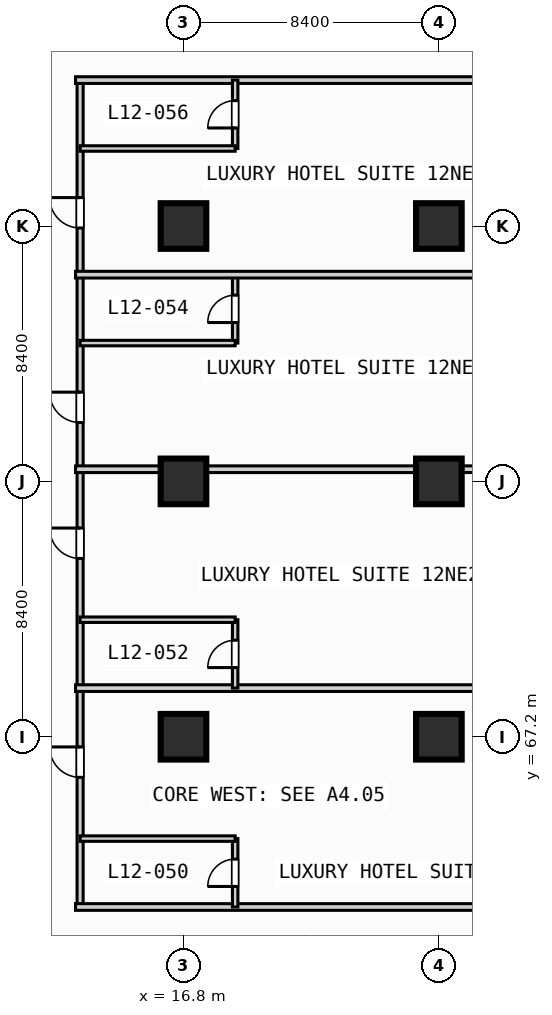
"""IFC4 building model, lengths in metres.
Left out: names, types, materials, properties, quantities, classifications, styles, units other than length and angle.
Written with IfcOpenShell. Run it as: python <this file> out.ifc"""

import sys

from ifc_helpers import new_model, si_unit, direction, frame, frame_2d, origin, origin_2d, place, context, subcontext, project, spatial, rectangle, extrude, element, fill, save


model = new_model("IFC4")
c1 = context("Model", 3, precision=1e-05, world=origin(), true_north=direction((0.0, 1.0)))
c2 = subcontext(c1, "Body", "Model", "MODEL_VIEW")
j1 = project(units=[si_unit("LENGTHUNIT", "METRE"), si_unit("PLANEANGLEUNIT", "RADIAN")], contexts=[c1])
p1 = place(None, origin())
s1 = spatial("IfcSite", under=j1, at=p1, CompositionType="ELEMENT")
p2 = place(p1, origin())
s2 = spatial("IfcBuilding", under=s1, at=p2, CompositionType="ELEMENT")
p3 = place(p2, frame((0.0, 0.0, 54.8)))
s3 = spatial("IfcBuildingStorey", under=s2, at=p3, CompositionType="ELEMENT", Elevation=54.8)
for number, where, z_axis, x_axis in (
    (1, (16.8, 67.2, 0.0), (0.0, 0.0, 1.0), (1.0, 0.0, 0.0)),
    (2, (16.8, 75.6, 0.0), (0.0, 0.0, 1.0), (1.0, 0.0, 0.0)),
    (3, (16.8, 84.0, 0.0), (0.0, 0.0, 1.0), (1.0, 0.0, 0.0)),
    (4, (25.2, 67.2, 0.0), (0.0, 0.0, 1.0), (1.0, 0.0, 0.0)),
    (5, (25.2, 75.6, 0.0), (0.0, 0.0, 1.0), (1.0, 0.0, 0.0)),
    (6, (25.2, 84.0, 0.0), (0.0, 0.0, 1.0), (1.0, 0.0, 0.0)),
):
    element("IfcColumn", number, at=place(p3, frame(where, z_axis=z_axis, x_axis=x_axis)), inside=s3, PredefinedType="COLUMN", context=c2, shape_type="SweptSolid", body=[
        extrude(rectangle(XDim=1.5, YDim=1.5, at=origin_2d()), origin(), (0.0, 0.0, 1.0), 3.8),
    ])
p4 = place(p3, frame((13.4, 61.6, 0.0), z_axis=(0.0, 0.0, 1.0), x_axis=(0.0, 1.0, 0.0)))
e7 = element("IfcWall", 7, at=p4, inside=s3, PredefinedType="PARTITIONING", context=c2, shape_type="SweptSolid", body=[
    extrude(rectangle(XDim=27.2, YDim=0.2, at=frame_2d((13.6, 0.0))), origin(), (0.0, 0.0, 1.0), 3.55),
])
p5 = place(p4, frame((4.265, 0.0, 0.0)))
e8 = element("IfcOpeningElement", 8, at=p5, cuts=e7, PredefinedType="OPENING", context=c2, shape_type="SweptSolid", body=[
    extrude(rectangle(XDim=1.0, YDim=2.15, at=frame_2d((0.5, 1.075))), frame((0.0, 0.11, 0.0), z_axis=(0.0, -1.0, 0.0), x_axis=(1.0, 0.0, 0.0)), (0.0, 0.0, 1.0), 0.22),
])
p6 = place(p4, frame((11.465, 0.0, 0.0)))
e9 = element("IfcOpeningElement", 9, at=p6, cuts=e7, PredefinedType="OPENING", context=c2, shape_type="SweptSolid", body=[
    extrude(rectangle(XDim=1.0, YDim=2.15, at=frame_2d((0.5, 1.075))), frame((0.0, 0.11, 0.0), z_axis=(0.0, -1.0, 0.0), x_axis=(1.0, 0.0, 0.0)), (0.0, 0.0, 1.0), 0.22),
])
p7 = place(p4, frame((15.935, 0.0, 0.0)))
e10 = element("IfcOpeningElement", 10, at=p7, cuts=e7, PredefinedType="OPENING", context=c2, shape_type="SweptSolid", body=[
    extrude(rectangle(XDim=1.0, YDim=2.15, at=frame_2d((0.5, 1.075))), frame((0.0, 0.11, 0.0), z_axis=(0.0, -1.0, 0.0), x_axis=(1.0, 0.0, 0.0)), (0.0, 0.0, 1.0), 0.22),
])
p8 = place(p4, frame((22.335, 0.0, 0.0)))
e11 = element("IfcOpeningElement", 11, at=p8, cuts=e7, PredefinedType="OPENING", context=c2, shape_type="SweptSolid", body=[
    extrude(rectangle(XDim=1.0, YDim=2.15, at=frame_2d((0.5, 1.075))), frame((0.0, 0.11, 0.0), z_axis=(0.0, -1.0, 0.0), x_axis=(1.0, 0.0, 0.0)), (0.0, 0.0, 1.0), 0.22),
])
p9 = place(p3, frame((13.25, 61.6, 0.0), z_axis=(0.0, 0.0, 1.0), x_axis=(1.0, 0.0, 0.0)))
e12 = element("IfcWall", 12, at=p9, inside=s3, PredefinedType="PARTITIONING", context=c2, shape_type="SweptSolid", body=[
    extrude(rectangle(XDim=20.18, YDim=0.22, at=frame_2d((10.09, 0.0))), origin(), (0.0, 0.0, 1.0), 3.55),
])
p10 = place(p3, frame((18.5, 61.6, 0.0), z_axis=(0.0, 0.0, 1.0), x_axis=(0.0, 1.0, 0.0)))
e13 = element("IfcWall", 13, at=p10, inside=s3, PredefinedType="PLUMBINGWALL", context=c2, shape_type="SweptSolid", body=[
    extrude(rectangle(XDim=2.25, YDim=0.18, at=frame_2d((1.125, 0.0))), origin(), (0.0, 0.0, 1.0), 3.55),
])
p11 = place(p10, frame((0.675, 0.0, 0.0)))
e14 = element("IfcOpeningElement", 14, at=p11, cuts=e13, PredefinedType="OPENING", context=c2, shape_type="SweptSolid", body=[
    extrude(rectangle(XDim=0.9, YDim=2.1, at=frame_2d((0.45, 1.05))), frame((0.0, 0.1, 0.0), z_axis=(0.0, -1.0, 0.0), x_axis=(1.0, 0.0, 0.0)), (0.0, 0.0, 1.0), 0.2),
])
p12 = place(p3, frame((13.4, 63.85, 0.0), z_axis=(0.0, 0.0, 1.0), x_axis=(1.0, 0.0, 0.0)))
e15 = element("IfcWall", 15, at=p12, inside=s3, PredefinedType="PLUMBINGWALL", context=c2, shape_type="SweptSolid", body=[
    extrude(rectangle(XDim=5.1, YDim=0.18, at=frame_2d((2.55, 0.0))), origin(), (0.0, 0.0, 1.0), 3.55),
])
p13 = place(p3, frame((13.25, 68.8, 0.0), z_axis=(0.0, 0.0, 1.0), x_axis=(1.0, 0.0, 0.0)))
e16 = element("IfcWall", 16, at=p13, inside=s3, PredefinedType="PARTITIONING", context=c2, shape_type="SweptSolid", body=[
    extrude(rectangle(XDim=20.18, YDim=0.22, at=frame_2d((10.09, 0.0))), origin(), (0.0, 0.0, 1.0), 3.55),
])
p14 = place(p3, frame((18.5, 68.8, 0.0), z_axis=(0.0, 0.0, 1.0), x_axis=(0.0, 1.0, 0.0)))
e17 = element("IfcWall", 17, at=p14, inside=s3, PredefinedType="PLUMBINGWALL", context=c2, shape_type="SweptSolid", body=[
    extrude(rectangle(XDim=2.25, YDim=0.18, at=frame_2d((1.125, 0.0))), origin(), (0.0, 0.0, 1.0), 3.55),
])
p15 = place(p14, frame((0.675, 0.0, 0.0)))
e18 = element("IfcOpeningElement", 18, at=p15, cuts=e17, PredefinedType="OPENING", context=c2, shape_type="SweptSolid", body=[
    extrude(rectangle(XDim=0.9, YDim=2.1, at=frame_2d((0.45, 1.05))), frame((0.0, 0.1, 0.0), z_axis=(0.0, -1.0, 0.0), x_axis=(1.0, 0.0, 0.0)), (0.0, 0.0, 1.0), 0.2),
])
p16 = place(p3, frame((13.4, 71.05, 0.0), z_axis=(0.0, 0.0, 1.0), x_axis=(1.0, 0.0, 0.0)))
e19 = element("IfcWall", 19, at=p16, inside=s3, PredefinedType="PLUMBINGWALL", context=c2, shape_type="SweptSolid", body=[
    extrude(rectangle(XDim=5.1, YDim=0.18, at=frame_2d((2.55, 0.0))), origin(), (0.0, 0.0, 1.0), 3.55),
])
p17 = place(p3, frame((13.25, 76.0, 0.0), z_axis=(0.0, 0.0, 1.0), x_axis=(1.0, 0.0, 0.0)))
e20 = element("IfcWall", 20, at=p17, inside=s3, PredefinedType="PARTITIONING", context=c2, shape_type="SweptSolid", body=[
    extrude(rectangle(XDim=20.18, YDim=0.22, at=frame_2d((10.09, 0.0))), origin(), (0.0, 0.0, 1.0), 3.55),
])
p18 = place(p3, frame((18.5, 80.15, 0.0), z_axis=(0.0, 0.0, 1.0), x_axis=(0.0, 1.0, 0.0)))
e21 = element("IfcWall", 21, at=p18, inside=s3, PredefinedType="PLUMBINGWALL", context=c2, shape_type="SweptSolid", body=[
    extrude(rectangle(XDim=2.25, YDim=0.18, at=frame_2d((1.125, 0.0))), origin(), (0.0, 0.0, 1.0), 3.55),
])
p19 = place(p18, frame((0.675, 0.0, 0.0)))
e22 = element("IfcOpeningElement", 22, at=p19, cuts=e21, PredefinedType="OPENING", context=c2, shape_type="SweptSolid", body=[
    extrude(rectangle(XDim=0.9, YDim=2.1, at=frame_2d((0.45, 1.05))), frame((0.0, 0.1, 0.0), z_axis=(0.0, -1.0, 0.0), x_axis=(1.0, 0.0, 0.0)), (0.0, 0.0, 1.0), 0.2),
])
p20 = place(p3, frame((13.4, 80.15, 0.0), z_axis=(0.0, 0.0, 1.0), x_axis=(1.0, 0.0, 0.0)))
e23 = element("IfcWall", 23, at=p20, inside=s3, PredefinedType="PLUMBINGWALL", context=c2, shape_type="SweptSolid", body=[
    extrude(rectangle(XDim=5.1, YDim=0.18, at=frame_2d((2.55, 0.0))), origin(), (0.0, 0.0, 1.0), 3.55),
])
for number, where, z_axis, x_axis in (
    (24, (13.25, 82.4, 0.0), (0.0, 0.0, 1.0), (1.0, 0.0, 0.0)),
    (25, (13.25, 88.8, 0.0), (0.0, 0.0, 1.0), (1.0, 0.0, 0.0)),
):
    element("IfcWall", number, at=place(p3, frame(where, z_axis=z_axis, x_axis=x_axis)), inside=s3, PredefinedType="PARTITIONING", context=c2, shape_type="SweptSolid", body=[
        extrude(rectangle(XDim=20.18, YDim=0.22, at=frame_2d((10.09, 0.0))), origin(), (0.0, 0.0, 1.0), 3.55),
    ])
p21 = place(p3, frame((18.5, 86.55, 0.0), z_axis=(0.0, 0.0, 1.0), x_axis=(0.0, 1.0, 0.0)))
e26 = element("IfcWall", 26, at=p21, inside=s3, PredefinedType="PLUMBINGWALL", context=c2, shape_type="SweptSolid", body=[
    extrude(rectangle(XDim=2.25, YDim=0.18, at=frame_2d((1.125, 0.0))), origin(), (0.0, 0.0, 1.0), 3.55),
])
p22 = place(p21, frame((0.675, 0.0, 0.0)))
e27 = element("IfcOpeningElement", 27, at=p22, cuts=e26, PredefinedType="OPENING", context=c2, shape_type="SweptSolid", body=[
    extrude(rectangle(XDim=0.9, YDim=2.1, at=frame_2d((0.45, 1.05))), frame((0.0, 0.1, 0.0), z_axis=(0.0, -1.0, 0.0), x_axis=(1.0, 0.0, 0.0)), (0.0, 0.0, 1.0), 0.2),
])
p23 = place(p3, frame((13.4, 86.55, 0.0), z_axis=(0.0, 0.0, 1.0), x_axis=(1.0, 0.0, 0.0)))
e28 = element("IfcWall", 28, at=p23, inside=s3, PredefinedType="PLUMBINGWALL", context=c2, shape_type="SweptSolid", body=[
    extrude(rectangle(XDim=5.1, YDim=0.18, at=frame_2d((2.55, 0.0))), origin(), (0.0, 0.0, 1.0), 3.55),
])
p24 = place(p5, origin())
e29 = element("IfcDoor", 29, at=p24, inside=s3, OperationType="SINGLE_SWING_RIGHT", PredefinedType="DOOR", context=c2, shape_type="SweptSolid", body=[
    extrude(rectangle(XDim=1.0, YDim=2.15, at=frame_2d((0.5, 1.075))), frame((0.0, 0.025, 0.0), z_axis=(0.0, -1.0, 0.0), x_axis=(1.0, 0.0, 0.0)), (0.0, 0.0, 1.0), 0.05),
])
fill(e8, e29)
p25 = place(p6, origin())
e30 = element("IfcDoor", 30, at=p25, inside=s3, OperationType="SINGLE_SWING_RIGHT", PredefinedType="DOOR", context=c2, shape_type="SweptSolid", body=[
    extrude(rectangle(XDim=1.0, YDim=2.15, at=frame_2d((0.5, 1.075))), frame((0.0, 0.025, 0.0), z_axis=(0.0, -1.0, 0.0), x_axis=(1.0, 0.0, 0.0)), (0.0, 0.0, 1.0), 0.05),
])
fill(e9, e30)
p26 = place(p7, origin())
e31 = element("IfcDoor", 31, at=p26, inside=s3, OperationType="SINGLE_SWING_RIGHT", PredefinedType="DOOR", context=c2, shape_type="SweptSolid", body=[
    extrude(rectangle(XDim=1.0, YDim=2.15, at=frame_2d((0.5, 1.075))), frame((0.0, 0.025, 0.0), z_axis=(0.0, -1.0, 0.0), x_axis=(1.0, 0.0, 0.0)), (0.0, 0.0, 1.0), 0.05),
])
fill(e10, e31)
p27 = place(p8, origin())
e32 = element("IfcDoor", 32, at=p27, inside=s3, OperationType="SINGLE_SWING_RIGHT", PredefinedType="DOOR", context=c2, shape_type="SweptSolid", body=[
    extrude(rectangle(XDim=1.0, YDim=2.15, at=frame_2d((0.5, 1.075))), frame((0.0, 0.025, 0.0), z_axis=(0.0, -1.0, 0.0), x_axis=(1.0, 0.0, 0.0)), (0.0, 0.0, 1.0), 0.05),
])
fill(e11, e32)
p28 = place(p11, origin())
e33 = element("IfcDoor", 33, at=p28, inside=s3, OperationType="SINGLE_SWING_LEFT", PredefinedType="DOOR", context=c2, shape_type="SweptSolid", body=[
    extrude(rectangle(XDim=0.9, YDim=2.1, at=frame_2d((0.45, 1.05))), frame((0.0, 0.025, 0.0), z_axis=(0.0, -1.0, 0.0), x_axis=(1.0, 0.0, 0.0)), (0.0, 0.0, 1.0), 0.05),
])
fill(e14, e33)
p29 = place(p15, origin())
e34 = element("IfcDoor", 34, at=p29, inside=s3, OperationType="SINGLE_SWING_LEFT", PredefinedType="DOOR", context=c2, shape_type="SweptSolid", body=[
    extrude(rectangle(XDim=0.9, YDim=2.1, at=frame_2d((0.45, 1.05))), frame((0.0, 0.025, 0.0), z_axis=(0.0, -1.0, 0.0), x_axis=(1.0, 0.0, 0.0)), (0.0, 0.0, 1.0), 0.05),
])
fill(e18, e34)
p30 = place(p19, origin())
e35 = element("IfcDoor", 35, at=p30, inside=s3, OperationType="SINGLE_SWING_LEFT", PredefinedType="DOOR", context=c2, shape_type="SweptSolid", body=[
    extrude(rectangle(XDim=0.9, YDim=2.1, at=frame_2d((0.45, 1.05))), frame((0.0, 0.025, 0.0), z_axis=(0.0, -1.0, 0.0), x_axis=(1.0, 0.0, 0.0)), (0.0, 0.0, 1.0), 0.05),
])
fill(e22, e35)
p31 = place(p22, origin())
e36 = element("IfcDoor", 36, at=p31, inside=s3, OperationType="SINGLE_SWING_LEFT", PredefinedType="DOOR", context=c2, shape_type="SweptSolid", body=[
    extrude(rectangle(XDim=0.9, YDim=2.1, at=frame_2d((0.45, 1.05))), frame((0.0, 0.025, 0.0), z_axis=(0.0, -1.0, 0.0), x_axis=(1.0, 0.0, 0.0)), (0.0, 0.0, 1.0), 0.05),
])
fill(e27, e36)
save(model, sys.argv[1])
